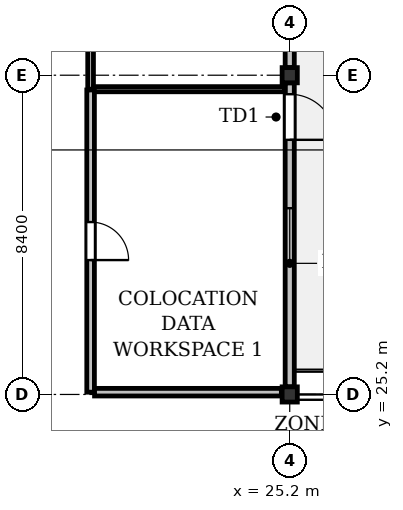
"""IFC4 building model, lengths in metres.
Left out: names, types, materials, properties, quantities, classifications, styles, units other than length and angle.
Written with IfcOpenShell. Run it as: python <this file> out.ifc"""

import sys

from ifc_helpers import new_model, si_unit, direction, frame, frame_2d, origin, origin_2d, place, context, subcontext, project, spatial, rectangle, i_section, extrude, element, fill, save


model = new_model("IFC4")
c1 = context("Model", 3, precision=1e-05, world=origin(), true_north=direction((0.0, 1.0)))
c2 = subcontext(c1, "Body", "Model", "MODEL_VIEW")
j1 = project(units=[si_unit("LENGTHUNIT", "METRE"), si_unit("PLANEANGLEUNIT", "RADIAN")], contexts=[c1])
p1 = place(None, origin())
s1 = spatial("IfcSite", under=j1, at=p1, CompositionType="ELEMENT")
p2 = place(p1, origin())
s2 = spatial("IfcBuilding", under=s1, at=p2, CompositionType="ELEMENT")
p3 = place(p2, frame((0.0, 0.0, 129.5)))
s3 = spatial("IfcBuildingStorey", under=s2, at=p3, CompositionType="ELEMENT", Elevation=129.5)
for number, where, z_axis, x_axis in (
    (1, (25.2, 25.2, 0.0), (0.0, 0.0, 1.0), (1.0, 0.0, 0.0)),
    (2, (25.2, 33.6, 0.0), (0.0, 0.0, 1.0), (1.0, 0.0, 0.0)),
):
    element("IfcColumn", number, at=place(p3, frame(where, z_axis=z_axis, x_axis=x_axis)), inside=s3, PredefinedType="COLUMN", context=c2, shape_type="SweptSolid", body=[
        extrude(i_section(OverallWidth=0.4, OverallDepth=0.4, WebThickness=0.025, FlangeThickness=0.04, at=origin_2d()), origin(), (0.0, 0.0, 1.0), 4.1),
    ])
p4 = place(p3, frame((25.2, 41.8, 0.0), z_axis=(0.0, 0.0, 1.0), x_axis=(0.0, -1.0, 0.0)))
e3 = element("IfcWall", 3, at=p4, inside=s3, PredefinedType="STANDARD", context=c2, shape_type="SweptSolid", body=[
    extrude(rectangle(XDim=8.0, YDim=0.24, at=frame_2d((4.0, 0.0))), origin(), (0.0, 0.0, 1.0), 3.422),
])
p5 = place(p4, frame((4.8, 0.0, 0.0)))
e4 = element("IfcOpeningElement", 4, at=p5, cuts=e3, PredefinedType="OPENING", context=c2, shape_type="SweptSolid", body=[
    extrude(rectangle(XDim=1.2, YDim=2.2, at=frame_2d((0.6, 1.1))), frame((0.0, 0.13, 0.0), z_axis=(0.0, -1.0, 0.0), x_axis=(1.0, 0.0, 0.0)), (0.0, 0.0, 1.0), 0.26),
])
p6 = place(p3, frame((25.2, 33.4, 0.0), z_axis=(0.0, 0.0, 1.0), x_axis=(0.0, -1.0, 0.0)))
e5 = element("IfcWall", 5, at=p6, inside=s3, PredefinedType="STANDARD", context=c2, shape_type="SweptSolid", body=[
    extrude(rectangle(XDim=8.0, YDim=0.24, at=frame_2d((4.0, 0.0))), origin(), (0.0, 0.0, 1.0), 3.422),
])
p7 = place(p6, frame((0.3, 0.0, 0.0)))
e6 = element("IfcOpeningElement", 6, at=p7, cuts=e5, PredefinedType="OPENING", context=c2, shape_type="SweptSolid", body=[
    extrude(rectangle(XDim=1.2, YDim=2.2, at=frame_2d((0.6, 1.1))), frame((0.0, 0.13, 0.0), z_axis=(0.0, -1.0, 0.0), x_axis=(1.0, 0.0, 0.0)), (0.0, 0.0, 1.0), 0.26),
])
p8 = place(p6, frame((3.299, 0.0, 0.9)))
e7 = element("IfcOpeningElement", 7, at=p8, cuts=e5, PredefinedType="OPENING", context=c2, shape_type="SweptSolid", body=[
    extrude(rectangle(XDim=1.5, YDim=1.6, at=frame_2d((0.75, 0.8))), frame((0.0, 0.13, 0.0), z_axis=(0.0, -1.0, 0.0), x_axis=(1.0, 0.0, 0.0)), (0.0, 0.0, 1.0), 0.26),
])
p9 = place(p3, frame((19.96, 43.0, 0.0), z_axis=(0.0, 0.0, 1.0), x_axis=(0.0, -1.0, 0.0)))
e8 = element("IfcWall", 8, at=p9, inside=s3, PredefinedType="PARTITIONING", context=c2, shape_type="SweptSolid", body=[
    extrude(rectangle(XDim=9.768, YDim=0.15, at=frame_2d((4.884, 0.0))), origin(), (0.0, 0.0, 1.0), 3.292),
])
p10 = place(p9, frame((4.409, 0.0, 0.0)))
e9 = element("IfcOpeningElement", 9, at=p10, cuts=e8, PredefinedType="OPENING", context=c2, shape_type="SweptSolid", body=[
    extrude(rectangle(XDim=0.95, YDim=2.15, at=frame_2d((0.475, 1.075))), frame((0.0, 0.085, 0.0), z_axis=(0.0, -1.0, 0.0), x_axis=(1.0, 0.0, 0.0)), (0.0, 0.0, 1.0), 0.17),
])
p11 = place(p3, frame((20.039, 33.232, 0.0), z_axis=(0.0, 0.0, 1.0), x_axis=(1.0, 0.0, 0.0)))
e10 = element("IfcWall", 10, at=p11, inside=s3, PredefinedType="PARTITIONING", context=c2, shape_type="SweptSolid", body=[
    extrude(rectangle(XDim=5.037, YDim=0.135, at=frame_2d((2.519, 0.0))), origin(), (0.0, 0.0, 1.0), 3.469),
])
p12 = place(p3, frame((19.96, 33.212, 0.0), z_axis=(0.0, 0.0, 1.0), x_axis=(0.0, -1.0, 0.0)))
e11 = element("IfcWall", 11, at=p12, inside=s3, PredefinedType="PARTITIONING", context=c2, shape_type="SweptSolid", body=[
    extrude(rectangle(XDim=7.952, YDim=0.2, at=frame_2d((3.976, 0.0))), origin(), (0.0, 0.0, 1.0), 3.292),
])
p13 = place(p12, frame((3.476, 0.0, 0.0)))
e12 = element("IfcOpeningElement", 12, at=p13, cuts=e11, PredefinedType="OPENING", context=c2, shape_type="SweptSolid", body=[
    extrude(rectangle(XDim=1.0, YDim=2.15, at=frame_2d((0.5, 1.075))), frame((0.0, 0.11, 0.0), z_axis=(0.0, -1.0, 0.0), x_axis=(1.0, 0.0, 0.0)), (0.0, 0.0, 1.0), 0.22),
])
p14 = place(p3, frame((20.064, 25.26, 0.0), z_axis=(0.0, 0.0, 1.0), x_axis=(1.0, 0.0, 0.0)))
e13 = element("IfcWall", 13, at=p14, inside=s3, PredefinedType="PARTITIONING", context=c2, shape_type="SweptSolid", body=[
    extrude(rectangle(XDim=4.916, YDim=0.2, at=frame_2d((2.458, 0.0))), origin(), (0.0, 0.0, 1.0), 3.292),
])
p15 = place(p7, origin())
e14 = element("IfcDoor", 14, at=p15, inside=s3, OperationType="SINGLE_SWING_RIGHT", PredefinedType="DOOR", context=c2, shape_type="SweptSolid", body=[
    extrude(rectangle(XDim=1.2, YDim=2.2, at=frame_2d((0.6, 1.1))), frame((0.0, 0.025, 0.0), z_axis=(0.0, -1.0, 0.0), x_axis=(1.0, 0.0, 0.0)), (0.0, 0.0, 1.0), 0.05),
])
fill(e6, e14)
p16 = place(p8, origin())
e15 = element("IfcWindow", 15, at=p16, inside=s3, PartitioningType="SINGLE_PANEL", PredefinedType="WINDOW", context=c2, shape_type="SweptSolid", body=[
    extrude(rectangle(XDim=1.5, YDim=1.6, at=frame_2d((0.75, 0.8))), frame((0.0, 0.03, 0.0), z_axis=(0.0, -1.0, 0.0), x_axis=(1.0, 0.0, 0.0)), (0.0, 0.0, 1.0), 0.06),
])
fill(e7, e15)
p17 = place(p13, origin())
e16 = element("IfcDoor", 16, at=p17, inside=s3, OperationType="SINGLE_SWING_RIGHT", PredefinedType="DOOR", context=c2, shape_type="SweptSolid", body=[
    extrude(rectangle(XDim=1.0, YDim=2.15, at=frame_2d((0.5, 1.075))), frame((0.0, 0.025, 0.0), z_axis=(0.0, -1.0, 0.0), x_axis=(1.0, 0.0, 0.0)), (0.0, 0.0, 1.0), 0.05),
])
fill(e12, e16)
save(model, sys.argv[1])
